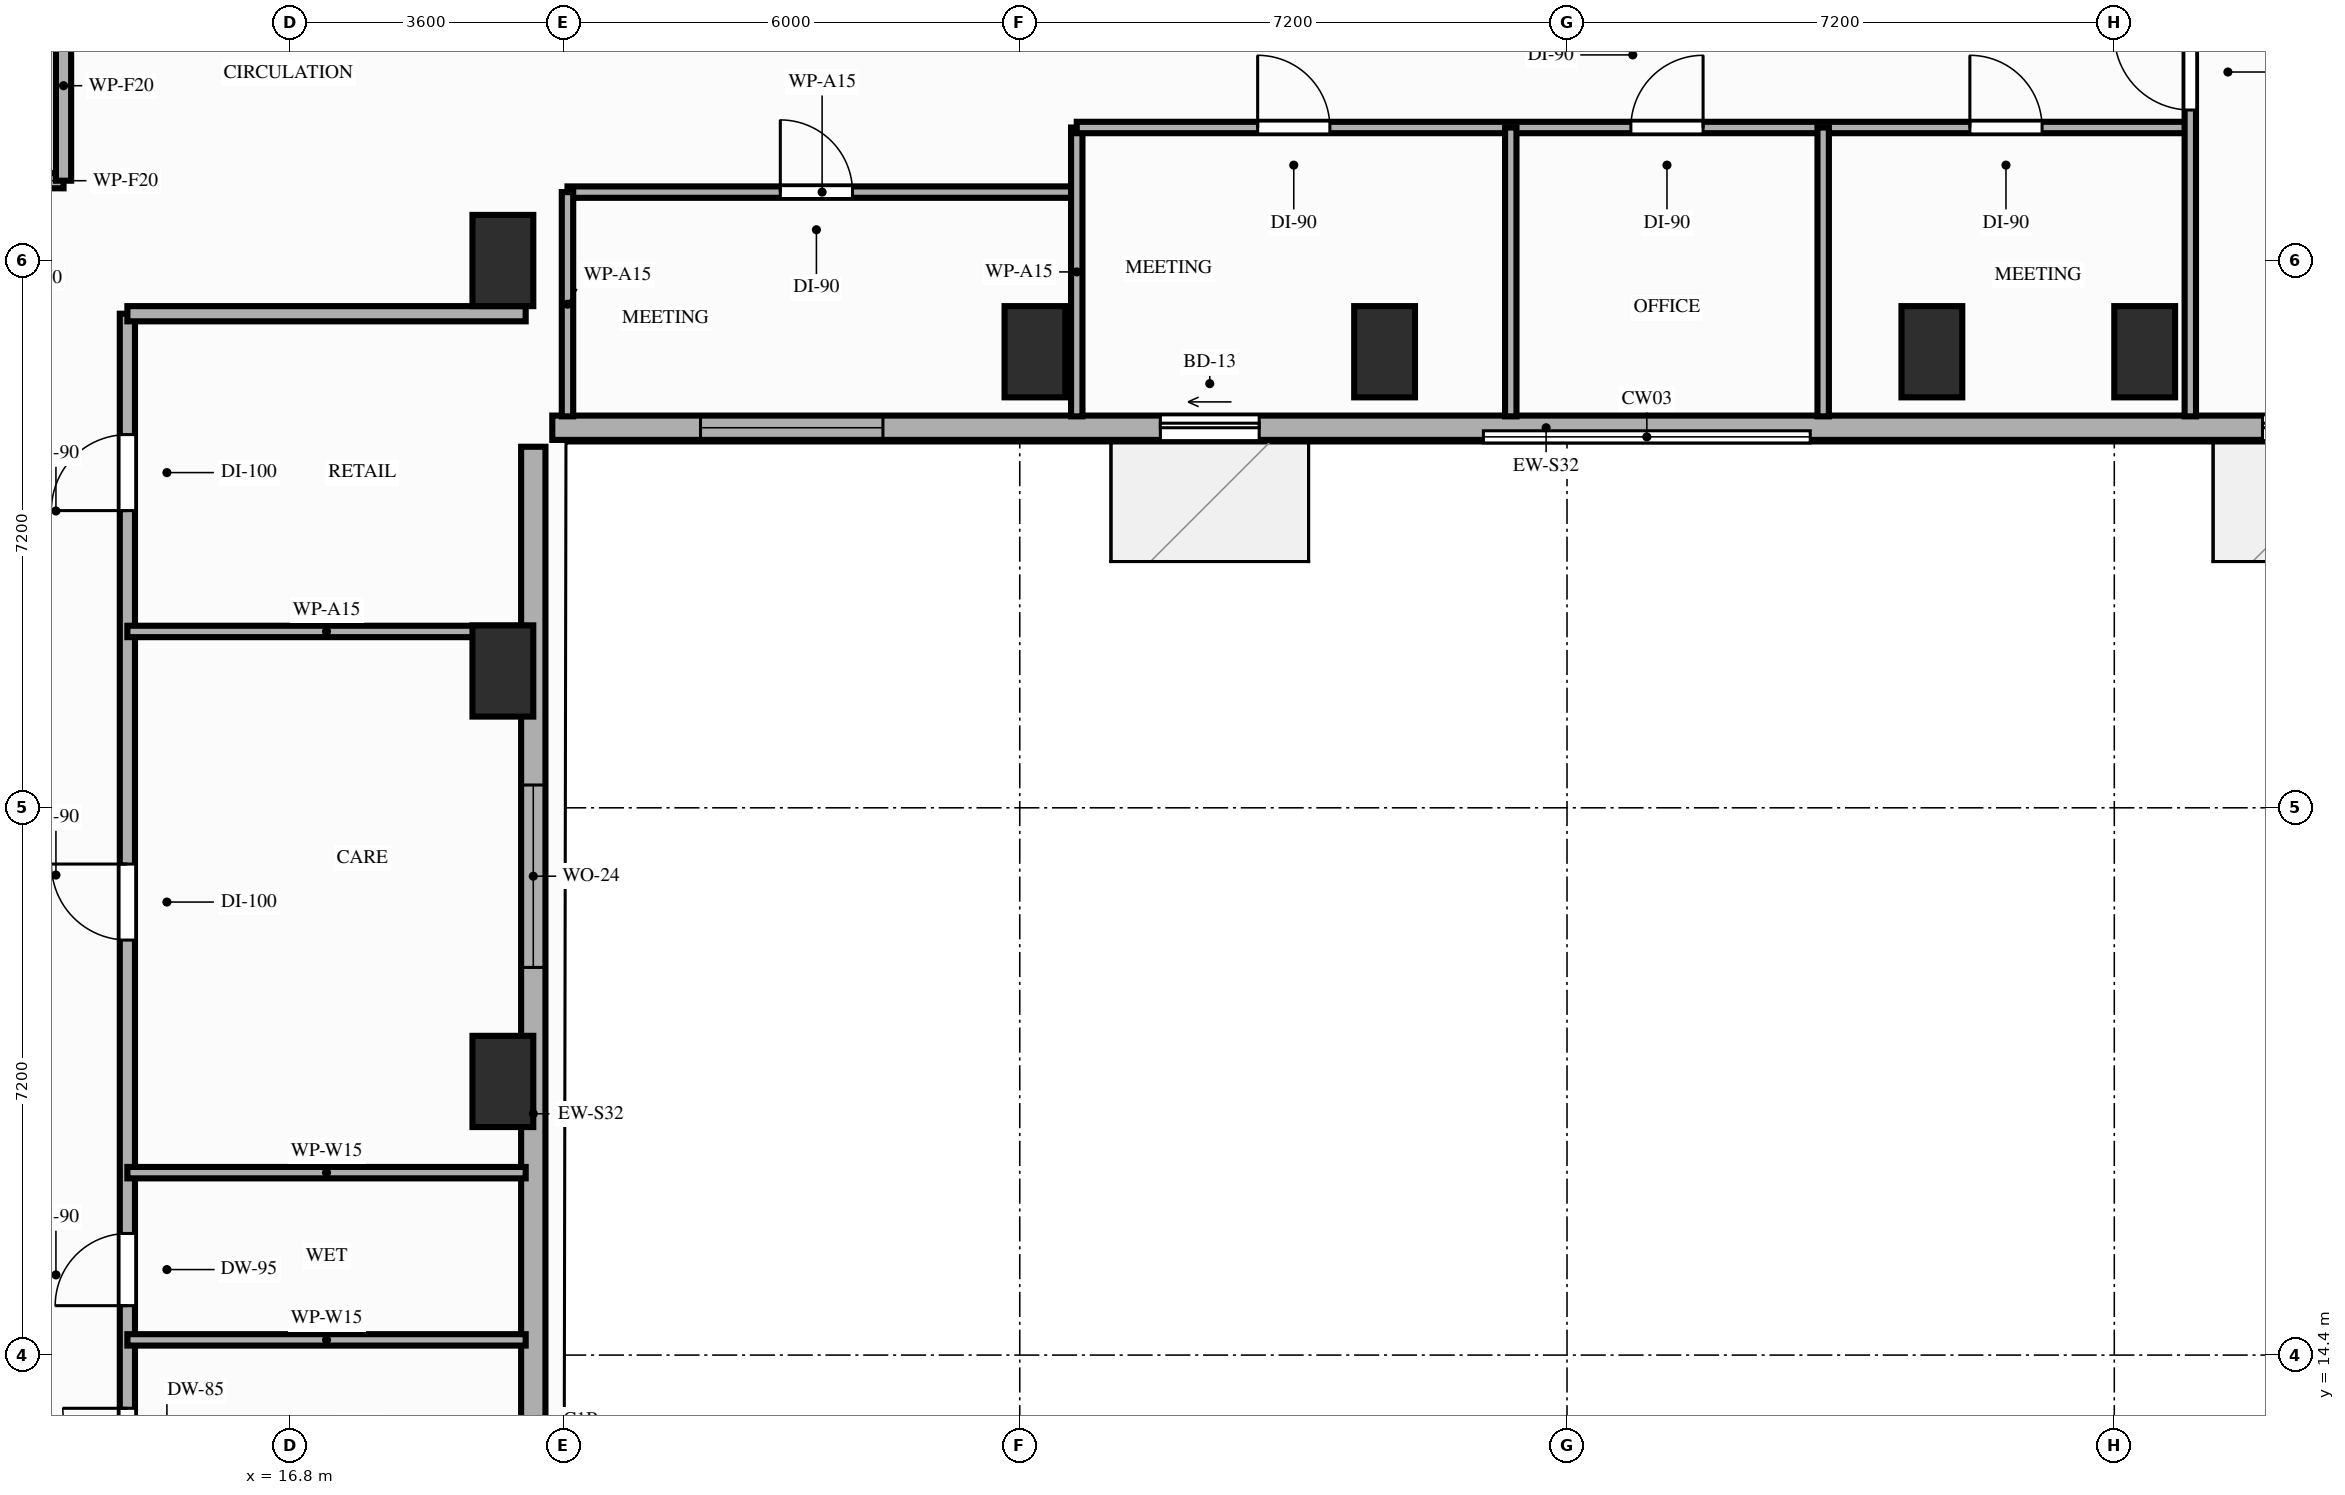
"""IFC4 building model, lengths in metres.
Left out: names, types, materials, properties, quantities, classifications, styles, units other than length and angle.
Written with IfcOpenShell. Run it as: python <this file> out.ifc"""

import sys

from ifc_helpers import new_model, si_unit, direction, frame, frame_2d, origin, origin_2d, place, context, subcontext, project, spatial, rectangle, extrude, element, fill, save


model = new_model("IFC4")
c1 = context("Model", 3, precision=1e-05, world=origin(), true_north=direction((0.0, 1.0)))
c2 = subcontext(c1, "Body", "Model", "MODEL_VIEW")
j1 = project(units=[si_unit("LENGTHUNIT", "METRE"), si_unit("PLANEANGLEUNIT", "RADIAN")], contexts=[c1])
p1 = place(None, origin())
s1 = spatial("IfcSite", under=j1, at=p1, CompositionType="ELEMENT")
p2 = place(p1, origin())
s2 = spatial("IfcBuilding", under=s1, at=p2, CompositionType="ELEMENT")
p3 = place(p2, frame((0.0, 0.0, 69.2)))
s3 = spatial("IfcBuildingStorey", under=s2, at=p3, CompositionType="ELEMENT", Elevation=69.2)
for number, where, z_axis, x_axis in (
    (1, (19.6, 18.0, 0.0), (0.0, 0.0, 1.0), (1.0, 0.0, 0.0)),
    (2, (19.6, 23.4, 0.0), (0.0, 0.0, 1.0), (1.0, 0.0, 0.0)),
    (3, (19.6, 28.8, 0.0), (0.0, 0.0, 1.0), (1.0, 0.0, 0.0)),
    (4, (26.6, 27.6, 0.0), (0.0, 0.0, 1.0), (1.0, 0.0, 0.0)),
    (5, (31.2, 27.6, 0.0), (0.0, 0.0, 1.0), (1.0, 0.0, 0.0)),
    (6, (38.4, 27.6, 0.0), (0.0, 0.0, 1.0), (1.0, 0.0, 0.0)),
    (7, (41.2, 27.6, 0.0), (0.0, 0.0, 1.0), (1.0, 0.0, 0.0)),
):
    element("IfcColumn", number, at=place(p3, frame(where, z_axis=z_axis, x_axis=x_axis)), inside=s3, PredefinedType="COLUMN", context=c2, shape_type="SweptSolid", body=[
        extrude(rectangle(XDim=0.8, YDim=1.2, at=origin_2d()), origin(), (0.0, 0.0, 1.0), 3.2),
    ])
p4 = place(p3, frame((20.0, 8.8, 0.0), z_axis=(0.0, 0.0, 1.0), x_axis=(0.0, 1.0, 0.0)))
e8 = element("IfcWall", 8, at=p4, inside=s3, PredefinedType="STANDARD", context=c2, shape_type="SweptSolid", body=[
    extrude(rectangle(XDim=17.55, YDim=0.32, at=frame_2d((8.775, 0.0))), origin(), (0.0, 0.0, 1.0), 2.41),
])
p5 = place(p4, frame((10.7, 0.0, 0.85)))
e9 = element("IfcOpeningElement", 9, at=p5, cuts=e8, PredefinedType="OPENING", context=c2, shape_type="SweptSolid", body=[
    extrude(rectangle(XDim=2.4, YDim=1.31, at=frame_2d((1.2, 0.655))), frame((0.0, 0.17, 0.0), z_axis=(0.0, -1.0, 0.0), x_axis=(1.0, 0.0, 0.0)), (0.0, 0.0, 1.0), 0.34),
])
p6 = place(p3, frame((20.25, 26.6, 0.0), z_axis=(0.0, 0.0, 1.0), x_axis=(1.0, 0.0, 0.0)))
e10 = element("IfcWall", 10, at=p6, inside=s3, PredefinedType="STANDARD", context=c2, shape_type="SweptSolid", body=[
    extrude(rectangle(XDim=26.15, YDim=0.32, at=frame_2d((13.075, 0.0))), origin(), (0.0, 0.0, 1.0), 3.02),
])
p7 = place(p6, frame((8.0, 0.0, 0.0)))
e11 = element("IfcOpeningElement", 11, at=p7, cuts=e10, PredefinedType="OPENING", context=c2, shape_type="SweptSolid", body=[
    extrude(rectangle(XDim=1.3, YDim=2.08, at=frame_2d((0.65, 1.04))), frame((0.0, 0.17, 0.0), z_axis=(0.0, -1.0, 0.0), x_axis=(1.0, 0.0, 0.0)), (0.0, 0.0, 1.0), 0.34),
])
p8 = place(p6, frame((22.5, 0.0, 0.0)))
e12 = element("IfcOpeningElement", 12, at=p8, cuts=e10, PredefinedType="OPENING", context=c2, shape_type="SweptSolid", body=[
    extrude(rectangle(XDim=1.3, YDim=2.08, at=frame_2d((0.65, 1.04))), frame((0.0, 0.17, 0.0), z_axis=(0.0, -1.0, 0.0), x_axis=(1.0, 0.0, 0.0)), (0.0, 0.0, 1.0), 0.34),
])
p9 = place(p6, frame((1.95, 0.0, 0.85)))
e13 = element("IfcOpeningElement", 13, at=p9, cuts=e10, PredefinedType="OPENING", context=c2, shape_type="SweptSolid", body=[
    extrude(rectangle(XDim=2.4, YDim=1.8, at=frame_2d((1.2, 0.9))), frame((0.0, 0.17, 0.0), z_axis=(0.0, -1.0, 0.0), x_axis=(1.0, 0.0, 0.0)), (0.0, 0.0, 1.0), 0.34),
])
p10 = place(p3, frame((12.55, 29.85, 0.0), z_axis=(0.0, 0.0, 1.0), x_axis=(1.0, 0.0, 0.0)))
e14 = element("IfcWall", 14, at=p10, inside=s3, PredefinedType="PARTITIONING", context=c2, shape_type="SweptSolid", body=[
    extrude(rectangle(XDim=1.27, YDim=0.2, at=frame_2d((0.635, 0.0))), origin(), (0.0, 0.0, 1.0), 3.02),
])
p11 = place(p10, frame((0.21, 0.0, 0.0)))
e15 = element("IfcOpeningElement", 15, at=p11, cuts=e14, PredefinedType="OPENING", context=c2, shape_type="SweptSolid", body=[
    extrude(rectangle(XDim=0.85, YDim=2.05, at=frame_2d((0.425, 1.025))), frame((0.0, 0.11, 0.0), z_axis=(0.0, -1.0, 0.0), x_axis=(1.0, 0.0, 0.0)), (0.0, 0.0, 1.0), 0.22),
])
p12 = place(p3, frame((13.82, 29.85, 0.0), z_axis=(0.0, 0.0, 1.0), x_axis=(0.0, 1.0, 0.0)))
e16 = element("IfcWall", 16, at=p12, inside=s3, PredefinedType="PARTITIONING", context=c2, shape_type="SweptSolid", body=[
    extrude(rectangle(XDim=2.5, YDim=0.2, at=frame_2d((1.25, 0.0))), origin(), (0.0, 0.0, 1.0), 3.02),
])
p13 = place(p3, frame((14.66, 12.4, 0.0), z_axis=(0.0, 0.0, 1.0), x_axis=(0.0, 1.0, 0.0)))
e17 = element("IfcWall", 17, at=p13, inside=s3, PredefinedType="PARTITIONING", context=c2, shape_type="SweptSolid", body=[
    extrude(rectangle(XDim=15.7, YDim=0.2, at=frame_2d((7.85, 0.0))), origin(), (0.0, 0.0, 1.0), 2.41),
])
p14 = place(p13, frame((0.45, 0.0, 0.0)))
e18 = element("IfcOpeningElement", 18, at=p14, cuts=e17, PredefinedType="OPENING", context=c2, shape_type="SweptSolid", body=[
    extrude(rectangle(XDim=0.85, YDim=2.1, at=frame_2d((0.425, 1.05))), frame((0.0, 0.11, 0.0), z_axis=(0.0, -1.0, 0.0), x_axis=(1.0, 0.0, 0.0)), (0.0, 0.0, 1.0), 0.22),
])
p15 = place(p13, frame((2.65, 0.0, 0.0)))
e19 = element("IfcOpeningElement", 19, at=p15, cuts=e17, PredefinedType="OPENING", context=c2, shape_type="SweptSolid", body=[
    extrude(rectangle(XDim=0.95, YDim=2.1, at=frame_2d((0.475, 1.05))), frame((0.0, 0.11, 0.0), z_axis=(0.0, -1.0, 0.0), x_axis=(1.0, 0.0, 0.0)), (0.0, 0.0, 1.0), 0.22),
])
p16 = place(p13, frame((7.46, 0.0, 0.0)))
e20 = element("IfcOpeningElement", 20, at=p16, cuts=e17, PredefinedType="OPENING", context=c2, shape_type="SweptSolid", body=[
    extrude(rectangle(XDim=1.0, YDim=2.15, at=frame_2d((0.5, 1.075))), frame((0.0, 0.11, 0.0), z_axis=(0.0, -1.0, 0.0), x_axis=(1.0, 0.0, 0.0)), (0.0, 0.0, 1.0), 0.22),
])
p17 = place(p13, frame((13.11, 0.0, 0.0)))
e21 = element("IfcOpeningElement", 21, at=p17, cuts=e17, PredefinedType="OPENING", context=c2, shape_type="SweptSolid", body=[
    extrude(rectangle(XDim=1.0, YDim=2.15, at=frame_2d((0.5, 1.075))), frame((0.0, 0.11, 0.0), z_axis=(0.0, -1.0, 0.0), x_axis=(1.0, 0.0, 0.0)), (0.0, 0.0, 1.0), 0.22),
])
p18 = place(p3, frame((14.66, 28.1, 0.0), z_axis=(0.0, 0.0, 1.0), x_axis=(1.0, 0.0, 0.0)))
e22 = element("IfcWall", 22, at=p18, inside=s3, PredefinedType="PARTITIONING", context=c2, shape_type="SweptSolid", body=[
    extrude(rectangle(XDim=5.24, YDim=0.2, at=frame_2d((2.62, 0.0))), origin(), (0.0, 0.0, 1.0), 2.41),
])
p19 = place(p3, frame((20.45, 29.7, 0.0), z_axis=(0.0, 0.0, 1.0), x_axis=(1.0, 0.0, 0.0)))
e23 = element("IfcWall", 23, at=p19, inside=s3, PredefinedType="PARTITIONING", context=c2, shape_type="SweptSolid", body=[
    extrude(rectangle(XDim=6.7, YDim=0.15, at=frame_2d((3.35, 0.0))), origin(), (0.0, 0.0, 1.0), 3.02),
])
p20 = place(p19, frame((2.8, 0.0, 0.0)))
e24 = element("IfcOpeningElement", 24, at=p20, cuts=e23, PredefinedType="OPENING", context=c2, shape_type="SweptSolid", body=[
    extrude(rectangle(XDim=0.95, YDim=2.15, at=frame_2d((0.475, 1.075))), frame((0.0, 0.085, 0.0), z_axis=(0.0, -1.0, 0.0), x_axis=(1.0, 0.0, 0.0)), (0.0, 0.0, 1.0), 0.17),
])
p21 = place(p3, frame((20.45, 26.75, 0.0), z_axis=(0.0, 0.0, 1.0), x_axis=(0.0, 1.0, 0.0)))
e25 = element("IfcWall", 25, at=p21, inside=s3, PredefinedType="PARTITIONING", context=c2, shape_type="SweptSolid", body=[
    extrude(rectangle(XDim=2.95, YDim=0.15, at=frame_2d((1.475, 0.0))), origin(), (0.0, 0.0, 1.0), 2.41),
])
p22 = place(p3, frame((27.15, 26.75, 0.0), z_axis=(0.0, 0.0, 1.0), x_axis=(0.0, 1.0, 0.0)))
e26 = element("IfcWall", 26, at=p22, inside=s3, PredefinedType="PARTITIONING", context=c2, shape_type="SweptSolid", body=[
    extrude(rectangle(XDim=3.8, YDim=0.15, at=frame_2d((1.9, 0.0))), origin(), (0.0, 0.0, 1.0), 2.41),
])
for number, where, z_axis, x_axis in (
    (27, (14.66, 14.6, 0.0), (0.0, 0.0, 1.0), (1.0, 0.0, 0.0)),
    (28, (14.66, 16.8, 0.0), (0.0, 0.0, 1.0), (1.0, 0.0, 0.0)),
    (29, (14.66, 23.92, 0.0), (0.0, 0.0, 1.0), (1.0, 0.0, 0.0)),
):
    element("IfcWall", number, at=place(p3, frame(where, z_axis=z_axis, x_axis=x_axis)), inside=s3, PredefinedType="PARTITIONING", context=c2, shape_type="SweptSolid", body=[
        extrude(rectangle(XDim=5.24, YDim=0.15, at=frame_2d((2.62, 0.0))), origin(), (0.0, 0.0, 1.0), 2.41),
    ])
p23 = place(p3, frame((27.15, 30.55, 0.0), z_axis=(0.0, 0.0, 1.0), x_axis=(1.0, 0.0, 0.0)))
e30 = element("IfcWall", 30, at=p23, inside=s3, PredefinedType="PARTITIONING", context=c2, shape_type="SweptSolid", body=[
    extrude(rectangle(XDim=14.65, YDim=0.15, at=frame_2d((7.325, 0.0))), origin(), (0.0, 0.0, 1.0), 2.41),
])
p24 = place(p23, frame((2.38, 0.0, 0.0)))
e31 = element("IfcOpeningElement", 31, at=p24, cuts=e30, PredefinedType="OPENING", context=c2, shape_type="SweptSolid", body=[
    extrude(rectangle(XDim=0.95, YDim=2.15, at=frame_2d((0.475, 1.075))), frame((0.0, 0.085, 0.0), z_axis=(0.0, -1.0, 0.0), x_axis=(1.0, 0.0, 0.0)), (0.0, 0.0, 1.0), 0.17),
])
p25 = place(p23, frame((7.29, 0.0, 0.0)))
e32 = element("IfcOpeningElement", 32, at=p25, cuts=e30, PredefinedType="OPENING", context=c2, shape_type="SweptSolid", body=[
    extrude(rectangle(XDim=0.95, YDim=2.15, at=frame_2d((0.475, 1.075))), frame((0.0, 0.085, 0.0), z_axis=(0.0, -1.0, 0.0), x_axis=(1.0, 0.0, 0.0)), (0.0, 0.0, 1.0), 0.17),
])
p26 = place(p23, frame((11.75, 0.0, 0.0)))
e33 = element("IfcOpeningElement", 33, at=p26, cuts=e30, PredefinedType="OPENING", context=c2, shape_type="SweptSolid", body=[
    extrude(rectangle(XDim=0.95, YDim=2.15, at=frame_2d((0.475, 1.075))), frame((0.0, 0.085, 0.0), z_axis=(0.0, -1.0, 0.0), x_axis=(1.0, 0.0, 0.0)), (0.0, 0.0, 1.0), 0.17),
])
p27 = place(p3, frame((41.8, 26.75, 0.0), z_axis=(0.0, 0.0, 1.0), x_axis=(0.0, 1.0, 0.0)))
e34 = element("IfcWall", 34, at=p27, inside=s3, PredefinedType="PARTITIONING", context=c2, shape_type="SweptSolid", body=[
    extrude(rectangle(XDim=15.45, YDim=0.15, at=frame_2d((7.725, 0.0))), origin(), (0.0, 0.0, 1.0), 2.41),
])
p28 = place(p27, frame((4.03, 0.0, 0.0)))
e35 = element("IfcOpeningElement", 35, at=p28, cuts=e34, PredefinedType="OPENING", context=c2, shape_type="SweptSolid", body=[
    extrude(rectangle(XDim=1.0, YDim=2.15, at=frame_2d((0.5, 1.075))), frame((0.0, 0.085, 0.0), z_axis=(0.0, -1.0, 0.0), x_axis=(1.0, 0.0, 0.0)), (0.0, 0.0, 1.0), 0.17),
])
for number, where, z_axis, x_axis in (
    (36, (32.86, 26.75, 0.0), (0.0, 0.0, 1.0), (0.0, 1.0, 0.0)),
    (37, (36.97, 26.75, 0.0), (0.0, 0.0, 1.0), (0.0, 1.0, 0.0)),
):
    element("IfcWall", number, at=place(p3, frame(where, z_axis=z_axis, x_axis=x_axis)), inside=s3, PredefinedType="PARTITIONING", context=c2, shape_type="SweptSolid", body=[
        extrude(rectangle(XDim=3.8, YDim=0.15, at=frame_2d((1.9, 0.0))), origin(), (0.0, 0.0, 1.0), 2.41),
    ])
p29 = place(p7, origin())
e38 = element("IfcDoor", 38, at=p29, inside=s3, OperationType="SLIDING_TO_LEFT", PredefinedType="DOOR", context=c2, shape_type="SweptSolid", body=[
    extrude(rectangle(XDim=1.3, YDim=2.08, at=frame_2d((0.65, 1.04))), frame((0.0, 0.025, 0.0), z_axis=(0.0, -1.0, 0.0), x_axis=(1.0, 0.0, 0.0)), (0.0, 0.0, 1.0), 0.05),
])
fill(e11, e38)
p30 = place(p8, origin())
e39 = element("IfcDoor", 39, at=p30, inside=s3, OperationType="SLIDING_TO_LEFT", PredefinedType="DOOR", context=c2, shape_type="SweptSolid", body=[
    extrude(rectangle(XDim=1.3, YDim=2.08, at=frame_2d((0.65, 1.04))), frame((0.0, 0.025, 0.0), z_axis=(0.0, -1.0, 0.0), x_axis=(1.0, 0.0, 0.0)), (0.0, 0.0, 1.0), 0.05),
])
fill(e12, e39)
p31 = place(p5, origin())
e40 = element("IfcWindow", 40, at=p31, inside=s3, PartitioningType="SINGLE_PANEL", PredefinedType="WINDOW", context=c2, shape_type="SweptSolid", body=[
    extrude(rectangle(XDim=2.4, YDim=1.31, at=frame_2d((1.2, 0.655))), frame((0.0, 0.03, 0.0), z_axis=(0.0, -1.0, 0.0), x_axis=(1.0, 0.0, 0.0)), (0.0, 0.0, 1.0), 0.06),
])
fill(e9, e40)
p32 = place(p9, origin())
e41 = element("IfcWindow", 41, at=p32, inside=s3, PartitioningType="SINGLE_PANEL", PredefinedType="WINDOW", context=c2, shape_type="SweptSolid", body=[
    extrude(rectangle(XDim=2.4, YDim=1.8, at=frame_2d((1.2, 0.9))), frame((0.0, 0.03, 0.0), z_axis=(0.0, -1.0, 0.0), x_axis=(1.0, 0.0, 0.0)), (0.0, 0.0, 1.0), 0.06),
])
fill(e13, e41)
p33 = place(p20, origin())
e42 = element("IfcDoor", 42, at=p33, inside=s3, OperationType="SINGLE_SWING_LEFT", PredefinedType="DOOR", context=c2, shape_type="SweptSolid", body=[
    extrude(rectangle(XDim=0.95, YDim=2.15, at=frame_2d((0.475, 1.075))), frame((0.0, 0.025, 0.0), z_axis=(0.0, -1.0, 0.0), x_axis=(1.0, 0.0, 0.0)), (0.0, 0.0, 1.0), 0.05),
])
fill(e24, e42)
p34 = place(p14, origin())
e43 = element("IfcDoor", 43, at=p34, inside=s3, OperationType="SINGLE_SWING_RIGHT", PredefinedType="DOOR", context=c2, shape_type="SweptSolid", body=[
    extrude(rectangle(XDim=0.85, YDim=2.1, at=frame_2d((0.425, 1.05))), frame((0.0, 0.025, 0.0), z_axis=(0.0, -1.0, 0.0), x_axis=(1.0, 0.0, 0.0)), (0.0, 0.0, 1.0), 0.05),
])
fill(e18, e43)
p35 = place(p15, origin())
e44 = element("IfcDoor", 44, at=p35, inside=s3, OperationType="SINGLE_SWING_LEFT", PredefinedType="DOOR", context=c2, shape_type="SweptSolid", body=[
    extrude(rectangle(XDim=0.95, YDim=2.1, at=frame_2d((0.475, 1.05))), frame((0.0, 0.025, 0.0), z_axis=(0.0, -1.0, 0.0), x_axis=(1.0, 0.0, 0.0)), (0.0, 0.0, 1.0), 0.05),
])
fill(e19, e44)
p36 = place(p16, origin())
e45 = element("IfcDoor", 45, at=p36, inside=s3, OperationType="SINGLE_SWING_RIGHT", PredefinedType="DOOR", context=c2, shape_type="SweptSolid", body=[
    extrude(rectangle(XDim=1.0, YDim=2.15, at=frame_2d((0.5, 1.075))), frame((0.0, 0.025, 0.0), z_axis=(0.0, -1.0, 0.0), x_axis=(1.0, 0.0, 0.0)), (0.0, 0.0, 1.0), 0.05),
])
fill(e20, e45)
p37 = place(p17, origin())
e46 = element("IfcDoor", 46, at=p37, inside=s3, OperationType="SINGLE_SWING_LEFT", PredefinedType="DOOR", context=c2, shape_type="SweptSolid", body=[
    extrude(rectangle(XDim=1.0, YDim=2.15, at=frame_2d((0.5, 1.075))), frame((0.0, 0.025, 0.0), z_axis=(0.0, -1.0, 0.0), x_axis=(1.0, 0.0, 0.0)), (0.0, 0.0, 1.0), 0.05),
])
fill(e21, e46)
p38 = place(p28, origin())
e47 = element("IfcDoor", 47, at=p38, inside=s3, OperationType="SINGLE_SWING_RIGHT", PredefinedType="DOOR", context=c2, shape_type="SweptSolid", body=[
    extrude(rectangle(XDim=1.0, YDim=2.15, at=frame_2d((0.5, 1.075))), frame((0.0, 0.025, 0.0), z_axis=(0.0, -1.0, 0.0), x_axis=(1.0, 0.0, 0.0)), (0.0, 0.0, 1.0), 0.05),
])
fill(e35, e47)
p39 = place(p24, origin())
e48 = element("IfcDoor", 48, at=p39, inside=s3, OperationType="SINGLE_SWING_LEFT", PredefinedType="DOOR", context=c2, shape_type="SweptSolid", body=[
    extrude(rectangle(XDim=0.95, YDim=2.15, at=frame_2d((0.475, 1.075))), frame((0.0, 0.025, 0.0), z_axis=(0.0, -1.0, 0.0), x_axis=(1.0, 0.0, 0.0)), (0.0, 0.0, 1.0), 0.05),
])
fill(e31, e48)
p40 = place(p25, origin())
e49 = element("IfcDoor", 49, at=p40, inside=s3, OperationType="SINGLE_SWING_RIGHT", PredefinedType="DOOR", context=c2, shape_type="SweptSolid", body=[
    extrude(rectangle(XDim=0.95, YDim=2.15, at=frame_2d((0.475, 1.075))), frame((0.0, 0.025, 0.0), z_axis=(0.0, -1.0, 0.0), x_axis=(1.0, 0.0, 0.0)), (0.0, 0.0, 1.0), 0.05),
])
fill(e32, e49)
p41 = place(p26, origin())
e50 = element("IfcDoor", 50, at=p41, inside=s3, OperationType="SINGLE_SWING_LEFT", PredefinedType="DOOR", context=c2, shape_type="SweptSolid", body=[
    extrude(rectangle(XDim=0.95, YDim=2.15, at=frame_2d((0.475, 1.075))), frame((0.0, 0.025, 0.0), z_axis=(0.0, -1.0, 0.0), x_axis=(1.0, 0.0, 0.0)), (0.0, 0.0, 1.0), 0.05),
])
fill(e33, e50)
save(model, sys.argv[1])
